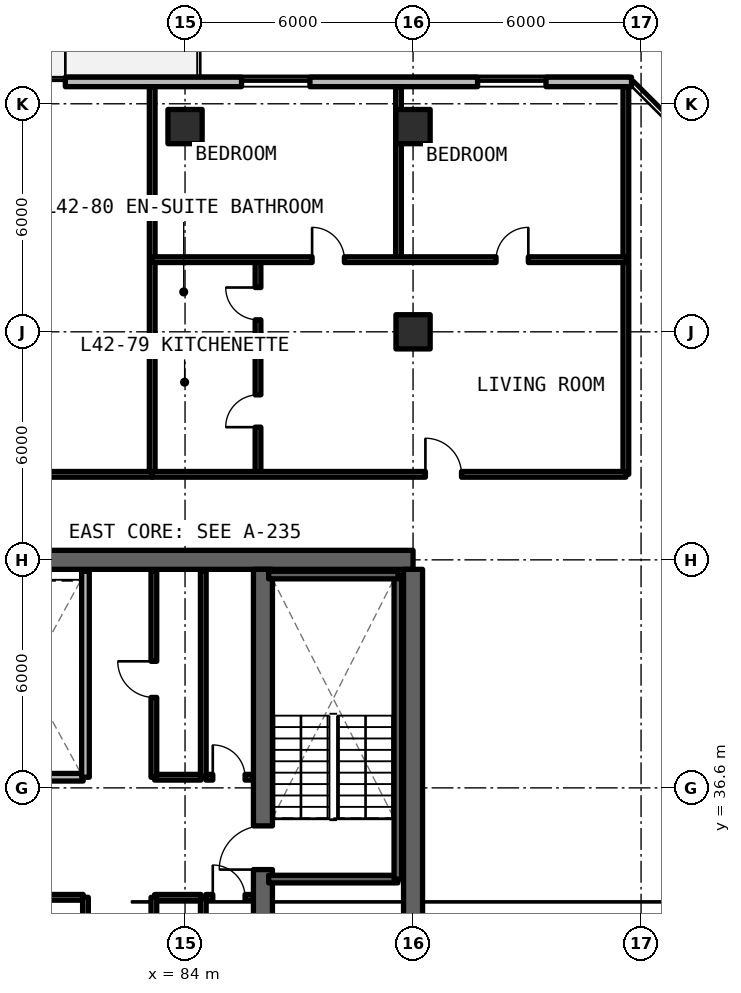
"""IFC4 building model, lengths in metres.
Left out: names, types, materials, properties, quantities, classifications, styles, units other than length and angle.
Written with IfcOpenShell. Run it as: python <this file> out.ifc"""

import sys

from ifc_helpers import new_model, si_unit, direction, frame, frame_2d, origin, origin_2d, place, context, subcontext, project, spatial, rectangle, extrude, element, fill, save


model = new_model("IFC4")
c1 = context("Model", 3, precision=1e-05, world=origin(), true_north=direction((0.0, 1.0)))
c2 = subcontext(c1, "Body", "Model", "MODEL_VIEW")
j1 = project(units=[si_unit("LENGTHUNIT", "METRE"), si_unit("PLANEANGLEUNIT", "RADIAN")], contexts=[c1])
p1 = place(None, origin())
s1 = spatial("IfcSite", under=j1, at=p1, CompositionType="ELEMENT")
p2 = place(p1, origin())
s2 = spatial("IfcBuilding", under=s1, at=p2, CompositionType="ELEMENT")
p3 = place(p2, frame((0.0, 0.0, 151.8)))
s3 = spatial("IfcBuildingStorey", under=s2, at=p3, CompositionType="ELEMENT", Elevation=151.8)
p4 = place(p3, frame((90.0, 42.6, 0.0), z_axis=(0.0, 0.0, 1.0), x_axis=(-1.0, 0.0, 0.0)))
e1 = element("IfcWall", 1, at=p4, inside=s3, PredefinedType="SHEAR", context=c2, shape_type="SweptSolid", body=[
    extrude(rectangle(XDim=12.0, YDim=0.5, at=frame_2d((6.0, 0.0))), origin(), (0.0, 0.0, 1.0), 3.3),
])
p5 = place(p3, frame((90.0, 24.85, 0.0), z_axis=(0.0, 0.0, 1.0), x_axis=(0.0, 1.0, 0.0)))
e2 = element("IfcWall", 2, at=p5, inside=s3, PredefinedType="SHEAR", context=c2, shape_type="SweptSolid", body=[
    extrude(rectangle(XDim=17.5, YDim=0.5, at=frame_2d((8.75, 0.0))), origin(), (0.0, 0.0, 1.0), 3.3),
])
p6 = place(p3, frame((86.05, 24.85, 0.0), z_axis=(0.0, 0.0, 1.0), x_axis=(0.0, 1.0, 0.0)))
e3 = element("IfcWall", 3, at=p6, inside=s3, PredefinedType="SHEAR", context=c2, shape_type="SweptSolid", body=[
    extrude(rectangle(XDim=17.5, YDim=0.5, at=frame_2d((8.75, 0.0))), origin(), (0.0, 0.0, 1.0), 3.3),
])
p7 = place(p6, frame((0.4, 0.0, 0.0)))
e4 = element("IfcOpeningElement", 4, at=p7, cuts=e3, PredefinedType="OPENING", context=c2, shape_type="SweptSolid", body=[
    extrude(rectangle(XDim=1.15, YDim=2.15, at=frame_2d((0.575, 1.075))), frame((0.0, 0.26, 0.0), z_axis=(0.0, -1.0, 0.0), x_axis=(1.0, 0.0, 0.0)), (0.0, 0.0, 1.0), 0.52),
])
p8 = place(p6, frame((9.6, 0.0, 0.0)))
e5 = element("IfcOpeningElement", 5, at=p8, cuts=e3, PredefinedType="OPENING", context=c2, shape_type="SweptSolid", body=[
    extrude(rectangle(XDim=1.15, YDim=2.15, at=frame_2d((0.575, 1.075))), frame((0.0, 0.26, 0.0), z_axis=(0.0, -1.0, 0.0), x_axis=(1.0, 0.0, 0.0)), (0.0, 0.0, 1.0), 0.52),
])
for number, where, z_axis, x_axis in (
    (6, (90.0, 48.6, 0.0), (0.0, 0.0, 1.0), (1.0, 0.0, 0.0)),
    (7, (84.0, 54.0, 0.0), (0.0, 0.0, 1.0), (1.0, 0.0, 0.0)),
    (8, (90.0, 54.0, 0.0), (0.0, 0.0, 1.0), (1.0, 0.0, 0.0)),
):
    element("IfcColumn", number, at=place(p3, frame(where, z_axis=z_axis, x_axis=x_axis)), inside=s3, PredefinedType="COLUMN", context=c2, shape_type="SweptSolid", body=[
        extrude(rectangle(XDim=0.9, YDim=0.9, at=origin_2d()), origin(), (0.0, 0.0, 1.0), 3.3),
    ])
p9 = place(p3, frame((95.748, 55.175, 0.0), z_axis=(0.0, 0.0, 1.0), x_axis=(-1.0, 0.0, 0.0)))
e9 = element("IfcWall", 9, at=p9, inside=s3, PredefinedType="SOLIDWALL", context=c2, shape_type="SweptSolid", body=[
    extrude(rectangle(XDim=43.623, YDim=0.25, at=frame_2d((21.812, 0.0))), origin(), (0.0, 0.0, 1.0), 3.08),
])
p10 = place(p9, frame((26.748, 0.0, 0.0)))
e10 = element("IfcOpeningElement", 10, at=p10, cuts=e9, PredefinedType="OPENING", context=c2, shape_type="SweptSolid", body=[
    extrude(rectangle(XDim=1.1, YDim=2.15, at=frame_2d((0.55, 1.075))), frame((0.0, 0.135, 0.0), z_axis=(0.0, -1.0, 0.0), x_axis=(1.0, 0.0, 0.0)), (0.0, 0.0, 1.0), 0.27),
])
p11 = place(p9, frame((14.898, 0.0, 0.0)))
e11 = element("IfcOpeningElement", 11, at=p11, cuts=e9, PredefinedType="OPENING", context=c2, shape_type="SweptSolid", body=[
    extrude(rectangle(XDim=1.1, YDim=2.15, at=frame_2d((0.55, 1.075))), frame((0.0, 0.135, 0.0), z_axis=(0.0, -1.0, 0.0), x_axis=(1.0, 0.0, 0.0)), (0.0, 0.0, 1.0), 0.27),
])
p12 = place(p9, frame((39.082, 0.0, 0.78)))
e12 = element("IfcOpeningElement", 12, at=p12, cuts=e9, PredefinedType="OPENING", context=c2, shape_type="SweptSolid", body=[
    extrude(rectangle(XDim=1.8, YDim=1.66, at=frame_2d((0.9, 0.83))), frame((0.0, 0.135, 0.0), z_axis=(0.0, -1.0, 0.0), x_axis=(1.0, 0.0, 0.0)), (0.0, 0.0, 1.0), 0.27),
])
p13 = place(p9, frame((33.045, 0.0, 0.78)))
e13 = element("IfcOpeningElement", 13, at=p13, cuts=e9, PredefinedType="OPENING", context=c2, shape_type="SweptSolid", body=[
    extrude(rectangle(XDim=1.8, YDim=1.66, at=frame_2d((0.9, 0.83))), frame((0.0, 0.135, 0.0), z_axis=(0.0, -1.0, 0.0), x_axis=(1.0, 0.0, 0.0)), (0.0, 0.0, 1.0), 0.27),
])
p14 = place(p9, frame((8.462, 0.0, 0.78)))
e14 = element("IfcOpeningElement", 14, at=p14, cuts=e9, PredefinedType="OPENING", context=c2, shape_type="SweptSolid", body=[
    extrude(rectangle(XDim=1.8, YDim=1.66, at=frame_2d((0.9, 0.83))), frame((0.0, 0.135, 0.0), z_axis=(0.0, -1.0, 0.0), x_axis=(1.0, 0.0, 0.0)), (0.0, 0.0, 1.0), 0.27),
])
p15 = place(p9, frame((2.25, 0.0, 0.78)))
e15 = element("IfcOpeningElement", 15, at=p15, cuts=e9, PredefinedType="OPENING", context=c2, shape_type="SweptSolid", body=[
    extrude(rectangle(XDim=1.8, YDim=1.66, at=frame_2d((0.9, 0.83))), frame((0.0, 0.135, 0.0), z_axis=(0.0, -1.0, 0.0), x_axis=(1.0, 0.0, 0.0)), (0.0, 0.0, 1.0), 0.27),
])
p16 = place(p3, frame((84.48, 28.5, 0.0), z_axis=(0.0, 0.0, 1.0), x_axis=(0.0, 1.0, 0.0)))
e16 = element("IfcWall", 16, at=p16, inside=s3, PredefinedType="SOLIDWALL", context=c2, shape_type="SweptSolid", body=[
    extrude(rectangle(XDim=5.22, YDim=0.15, at=frame_2d((2.61, 0.0))), origin(), (0.0, 0.0, 1.0), 2.35),
])
p17 = place(p3, frame((84.55, 33.72, 0.0), z_axis=(0.0, 0.0, 1.0), x_axis=(1.0, 0.0, 0.0)))
e17 = element("IfcWall", 17, at=p17, inside=s3, PredefinedType="SOLIDWALL", context=c2, shape_type="SweptSolid", body=[
    extrude(rectangle(XDim=1.23, YDim=0.15, at=frame_2d((0.615, 0.0))), origin(), (0.0, 0.0, 1.0), 2.35),
])
p18 = place(p17, frame((0.18, 0.0, 0.0)))
e18 = element("IfcOpeningElement", 18, at=p18, cuts=e17, PredefinedType="OPENING", context=c2, shape_type="SweptSolid", body=[
    extrude(rectangle(XDim=0.85, YDim=2.1, at=frame_2d((0.425, 1.05))), frame((0.0, 0.085, 0.0), z_axis=(0.0, -1.0, 0.0), x_axis=(1.0, 0.0, 0.0)), (0.0, 0.0, 1.0), 0.17),
])
p19 = place(p3, frame((83.2, 33.72, 0.0), z_axis=(0.0, 0.0, 1.0), x_axis=(1.0, 0.0, 0.0)))
e19 = element("IfcWall", 19, at=p19, inside=s3, PredefinedType="SOLIDWALL", context=c2, shape_type="SweptSolid", body=[
    extrude(rectangle(XDim=1.22, YDim=0.15, at=frame_2d((0.61, 0.0))), origin(), (0.0, 0.0, 1.0), 2.35),
])
p20 = place(p3, frame((83.18, 28.5, 0.0), z_axis=(0.0, 0.0, 1.0), x_axis=(0.0, 1.0, 0.0)))
e20 = element("IfcWall", 20, at=p20, inside=s3, PredefinedType="SOLIDWALL", context=c2, shape_type="SweptSolid", body=[
    extrude(rectangle(XDim=5.22, YDim=0.15, at=frame_2d((2.61, 0.0))), origin(), (0.0, 0.0, 1.0), 2.35),
])
p21 = place(p20, frame((2.0, 0.0, 0.0)))
e21 = element("IfcOpeningElement", 21, at=p21, cuts=e20, PredefinedType="OPENING", context=c2, shape_type="SweptSolid", body=[
    extrude(rectangle(XDim=0.95, YDim=2.15, at=frame_2d((0.475, 1.075))), frame((0.0, 0.085, 0.0), z_axis=(0.0, -1.0, 0.0), x_axis=(1.0, 0.0, 0.0)), (0.0, 0.0, 1.0), 0.17),
])
p22 = place(p3, frame((79.76, 33.72, 0.0), z_axis=(0.0, 0.0, 1.0), x_axis=(1.0, 0.0, 0.0)))
e22 = element("IfcWall", 22, at=p22, inside=s3, PredefinedType="SOLIDWALL", context=c2, shape_type="SweptSolid", body=[
    extrude(rectangle(XDim=1.56, YDim=0.15, at=frame_2d((0.78, 0.0))), origin(), (0.0, 0.0, 1.0), 2.35),
])
p23 = place(p3, frame((81.38, 28.5, 0.0), z_axis=(0.0, 0.0, 1.0), x_axis=(0.0, 1.0, 0.0)))
e23 = element("IfcWall", 23, at=p23, inside=s3, PredefinedType="SOLIDWALL", context=c2, shape_type="SweptSolid", body=[
    extrude(rectangle(XDim=5.22, YDim=0.15, at=frame_2d((2.61, 0.0))), origin(), (0.0, 0.0, 1.0), 2.35),
])
p24 = place(p23, frame((2.0, 0.0, 0.0)))
e24 = element("IfcOpeningElement", 24, at=p24, cuts=e23, PredefinedType="OPENING", context=c2, shape_type="SweptSolid", body=[
    extrude(rectangle(XDim=0.95, YDim=2.15, at=frame_2d((0.475, 1.075))), frame((0.0, 0.085, 0.0), z_axis=(0.0, -1.0, 0.0), x_axis=(1.0, 0.0, 0.0)), (0.0, 0.0, 1.0), 0.17),
])
p25 = place(p3, frame((84.48, 36.88, 0.0), z_axis=(0.0, 0.0, 1.0), x_axis=(0.0, 1.0, 0.0)))
e25 = element("IfcWall", 25, at=p25, inside=s3, PredefinedType="SOLIDWALL", context=c2, shape_type="SweptSolid", body=[
    extrude(rectangle(XDim=5.42, YDim=0.15, at=frame_2d((2.71, 0.0))), origin(), (0.0, 0.0, 1.0), 2.35),
])
p26 = place(p3, frame((84.55, 36.88, 0.0), z_axis=(0.0, 0.0, 1.0), x_axis=(1.0, 0.0, 0.0)))
e26 = element("IfcWall", 26, at=p26, inside=s3, PredefinedType="SOLIDWALL", context=c2, shape_type="SweptSolid", body=[
    extrude(rectangle(XDim=1.23, YDim=0.15, at=frame_2d((0.615, 0.0))), origin(), (0.0, 0.0, 1.0), 2.35),
])
p27 = place(p26, frame((0.18, 0.0, 0.0)))
e27 = element("IfcOpeningElement", 27, at=p27, cuts=e26, PredefinedType="OPENING", context=c2, shape_type="SweptSolid", body=[
    extrude(rectangle(XDim=0.85, YDim=2.1, at=frame_2d((0.425, 1.05))), frame((0.0, 0.085, 0.0), z_axis=(0.0, -1.0, 0.0), x_axis=(1.0, 0.0, 0.0)), (0.0, 0.0, 1.0), 0.17),
])
p28 = place(p3, frame((83.2, 36.88, 0.0), z_axis=(0.0, 0.0, 1.0), x_axis=(1.0, 0.0, 0.0)))
e28 = element("IfcWall", 28, at=p28, inside=s3, PredefinedType="SOLIDWALL", context=c2, shape_type="SweptSolid", body=[
    extrude(rectangle(XDim=1.22, YDim=0.15, at=frame_2d((0.61, 0.0))), origin(), (0.0, 0.0, 1.0), 2.35),
])
p29 = place(p3, frame((83.18, 36.88, 0.0), z_axis=(0.0, 0.0, 1.0), x_axis=(0.0, 1.0, 0.0)))
e29 = element("IfcWall", 29, at=p29, inside=s3, PredefinedType="SOLIDWALL", context=c2, shape_type="SweptSolid", body=[
    extrude(rectangle(XDim=5.42, YDim=0.15, at=frame_2d((2.71, 0.0))), origin(), (0.0, 0.0, 1.0), 2.35),
])
p30 = place(p29, frame((2.1, 0.0, 0.0)))
e30 = element("IfcOpeningElement", 30, at=p30, cuts=e29, PredefinedType="OPENING", context=c2, shape_type="SweptSolid", body=[
    extrude(rectangle(XDim=0.95, YDim=2.15, at=frame_2d((0.475, 1.075))), frame((0.0, 0.085, 0.0), z_axis=(0.0, -1.0, 0.0), x_axis=(1.0, 0.0, 0.0)), (0.0, 0.0, 1.0), 0.17),
])
p31 = place(p3, frame((78.27, 36.88, 0.0), z_axis=(0.0, 0.0, 1.0), x_axis=(1.0, 0.0, 0.0)))
e31 = element("IfcWall", 31, at=p31, inside=s3, PredefinedType="SOLIDWALL", context=c2, shape_type="SweptSolid", body=[
    extrude(rectangle(XDim=3.05, YDim=0.2, at=frame_2d((1.525, 0.0))), origin(), (0.0, 0.0, 1.0), 2.35),
])
p32 = place(p3, frame((81.38, 36.88, 0.0), z_axis=(0.0, 0.0, 1.0), x_axis=(0.0, 1.0, 0.0)))
e32 = element("IfcWall", 32, at=p32, inside=s3, PredefinedType="SOLIDWALL", context=c2, shape_type="SweptSolid", body=[
    extrude(rectangle(XDim=5.42, YDim=0.2, at=frame_2d((2.71, 0.0))), origin(), (0.0, 0.0, 1.0), 2.35),
])
for number, where, z_axis, x_axis in (
    (33, (95.6, 44.85, 0.0), (0.0, 0.0, 1.0), (0.0, 1.0, 0.0)),
    (34, (83.136, 44.85, 0.0), (0.0, 0.0, 1.0), (0.0, 1.0, 0.0)),
):
    element("IfcWall", number, at=place(p3, frame(where, z_axis=z_axis, x_axis=x_axis)), inside=s3, PredefinedType="SOLIDWALL", context=c2, shape_type="SweptSolid", body=[
        extrude(rectangle(XDim=10.2, YDim=0.15, at=frame_2d((5.1, 0.0))), origin(), (0.0, 0.0, 1.0), 2.35),
    ])
p33 = place(p3, frame((73.28, 44.85, 0.0), z_axis=(0.0, 0.0, 1.0), x_axis=(1.0, 0.0, 0.0)))
e35 = element("IfcWall", 35, at=p33, inside=s3, PredefinedType="SOLIDWALL", context=c2, shape_type="SweptSolid", body=[
    extrude(rectangle(XDim=9.855, YDim=0.15, at=frame_2d((4.928, 0.0))), origin(), (0.0, 0.0, 1.0), 2.35),
])
p34 = place(p33, frame((4.378, 0.0, 0.0)))
e36 = element("IfcOpeningElement", 36, at=p34, cuts=e35, PredefinedType="OPENING", context=c2, shape_type="SweptSolid", body=[
    extrude(rectangle(XDim=1.1, YDim=2.15, at=frame_2d((0.55, 1.075))), frame((0.0, 0.085, 0.0), z_axis=(0.0, -1.0, 0.0), x_axis=(1.0, 0.0, 0.0)), (0.0, 0.0, 1.0), 0.17),
])
p35 = place(p3, frame((83.136, 48.183, 0.0), z_axis=(0.0, 0.0, 1.0), x_axis=(1.0, 0.0, 0.0)))
e37 = element("IfcWall", 37, at=p35, inside=s3, PredefinedType="PARTITIONING", context=c2, shape_type="SweptSolid", body=[
    extrude(rectangle(XDim=2.784, YDim=0.15, at=frame_2d((1.392, 0.0))), origin(), (0.0, 0.0, 1.0), 2.35),
])
p36 = place(p3, frame((85.92, 44.85, 0.0), z_axis=(0.0, 0.0, 1.0), x_axis=(0.0, 1.0, 0.0)))
e38 = element("IfcWall", 38, at=p36, inside=s3, PredefinedType="PARTITIONING", context=c2, shape_type="SweptSolid", body=[
    extrude(rectangle(XDim=5.648, YDim=0.15, at=frame_2d((2.824, 0.0))), origin(), (0.0, 0.0, 1.0), 2.35),
])
p37 = place(p36, frame((1.241, 0.0, 0.0)))
e39 = element("IfcOpeningElement", 39, at=p37, cuts=e38, PredefinedType="OPENING", context=c2, shape_type="SweptSolid", body=[
    extrude(rectangle(XDim=0.85, YDim=2.1, at=frame_2d((0.425, 1.05))), frame((0.0, 0.085, 0.0), z_axis=(0.0, -1.0, 0.0), x_axis=(1.0, 0.0, 0.0)), (0.0, 0.0, 1.0), 0.17),
])
p38 = place(p36, frame((4.065, 0.0, 0.0)))
e40 = element("IfcOpeningElement", 40, at=p38, cuts=e38, PredefinedType="OPENING", context=c2, shape_type="SweptSolid", body=[
    extrude(rectangle(XDim=0.85, YDim=2.1, at=frame_2d((0.425, 1.05))), frame((0.0, 0.085, 0.0), z_axis=(0.0, -1.0, 0.0), x_axis=(1.0, 0.0, 0.0)), (0.0, 0.0, 1.0), 0.17),
])
p39 = place(p3, frame((89.617, 50.499, 0.0), z_axis=(0.0, 0.0, 1.0), x_axis=(0.0, 1.0, 0.0)))
e41 = element("IfcWall", 41, at=p39, inside=s3, PredefinedType="PARTITIONING", context=c2, shape_type="SweptSolid", body=[
    extrude(rectangle(XDim=4.552, YDim=0.15, at=frame_2d((2.276, 0.0))), origin(), (0.0, 0.0, 1.0), 2.35),
])
p40 = place(p3, frame((83.136, 50.499, 0.0), z_axis=(0.0, 0.0, 1.0), x_axis=(1.0, 0.0, 0.0)))
e42 = element("IfcWall", 42, at=p40, inside=s3, PredefinedType="PARTITIONING", context=c2, shape_type="SweptSolid", body=[
    extrude(rectangle(XDim=12.464, YDim=0.15, at=frame_2d((6.232, 0.0))), origin(), (0.0, 0.0, 1.0), 2.35),
])
p41 = place(p40, frame((4.208, 0.0, 0.0)))
e43 = element("IfcOpeningElement", 43, at=p41, cuts=e42, PredefinedType="OPENING", context=c2, shape_type="SweptSolid", body=[
    extrude(rectangle(XDim=0.85, YDim=2.1, at=frame_2d((0.425, 1.05))), frame((0.0, 0.085, 0.0), z_axis=(0.0, -1.0, 0.0), x_axis=(1.0, 0.0, 0.0)), (0.0, 0.0, 1.0), 0.17),
])
p42 = place(p40, frame((9.048, 0.0, 0.0)))
e44 = element("IfcOpeningElement", 44, at=p42, cuts=e42, PredefinedType="OPENING", context=c2, shape_type="SweptSolid", body=[
    extrude(rectangle(XDim=0.85, YDim=2.1, at=frame_2d((0.425, 1.05))), frame((0.0, 0.085, 0.0), z_axis=(0.0, -1.0, 0.0), x_axis=(1.0, 0.0, 0.0)), (0.0, 0.0, 1.0), 0.17),
])
p43 = place(p3, frame((83.136, 44.85, 0.0), z_axis=(0.0, 0.0, 1.0), x_axis=(1.0, 0.0, 0.0)))
e45 = element("IfcWall", 45, at=p43, inside=s3, PredefinedType="SOLIDWALL", context=c2, shape_type="SweptSolid", body=[
    extrude(rectangle(XDim=12.464, YDim=0.15, at=frame_2d((6.232, 0.0))), origin(), (0.0, 0.0, 1.0), 2.35),
])
p44 = place(p43, frame((7.189, 0.0, 0.0)))
e46 = element("IfcOpeningElement", 46, at=p44, cuts=e45, PredefinedType="OPENING", context=c2, shape_type="SweptSolid", body=[
    extrude(rectangle(XDim=0.95, YDim=2.15, at=frame_2d((0.475, 1.075))), frame((0.0, 0.085, 0.0), z_axis=(0.0, -1.0, 0.0), x_axis=(1.0, 0.0, 0.0)), (0.0, 0.0, 1.0), 0.17),
])
p45 = place(p3, frame((86.2, 34.2, 0.0), z_axis=(0.0, 0.0, 1.0), x_axis=(1.0, 0.0, 0.0)))
e47 = element("IfcWall", 47, at=p45, inside=s3, PredefinedType="SOLIDWALL", context=c2, shape_type="SweptSolid", body=[
    extrude(rectangle(XDim=3.4, YDim=0.2, at=frame_2d((1.7, 0.0))), origin(), (0.0, 0.0, 1.0), 3.3),
])
p46 = place(p3, frame((89.6, 34.2, 0.0), z_axis=(0.0, 0.0, 1.0), x_axis=(0.0, 1.0, 0.0)))
e48 = element("IfcWall", 48, at=p46, inside=s3, PredefinedType="SOLIDWALL", context=c2, shape_type="SweptSolid", body=[
    extrude(rectangle(XDim=8.0, YDim=0.2, at=frame_2d((4.0, 0.0))), origin(), (0.0, 0.0, 1.0), 3.3),
])
p47 = place(p3, frame((89.6, 42.2, 0.0), z_axis=(0.0, 0.0, 1.0), x_axis=(-1.0, 0.0, 0.0)))
e49 = element("IfcWall", 49, at=p47, inside=s3, PredefinedType="SOLIDWALL", context=c2, shape_type="SweptSolid", body=[
    extrude(rectangle(XDim=3.4, YDim=0.2, at=frame_2d((1.7, 0.0))), origin(), (0.0, 0.0, 1.0), 3.3),
])
p48 = place(p11, frame((1.1, 0.0, 0.0), z_axis=(0.0, 0.0, 1.0), x_axis=(-1.0, 0.0, 0.0)))
e50 = element("IfcDoor", 50, at=p48, inside=s3, OperationType="SINGLE_SWING_LEFT", PredefinedType="DOOR", context=c2, shape_type="SweptSolid", body=[
    extrude(rectangle(XDim=1.1, YDim=2.15, at=frame_2d((0.55, 1.075))), frame((0.0, 0.025, 0.0), z_axis=(0.0, -1.0, 0.0), x_axis=(1.0, 0.0, 0.0)), (0.0, 0.0, 1.0), 0.05),
])
fill(e11, e50)
p49 = place(p14, origin())
e51 = element("IfcWindow", 51, at=p49, inside=s3, PartitioningType="SINGLE_PANEL", PredefinedType="WINDOW", context=c2, shape_type="SweptSolid", body=[
    extrude(rectangle(XDim=1.8, YDim=1.66, at=frame_2d((0.9, 0.83))), frame((0.0, 0.03, 0.0), z_axis=(0.0, -1.0, 0.0), x_axis=(1.0, 0.0, 0.0)), (0.0, 0.0, 1.0), 0.06),
])
fill(e14, e51)
p50 = place(p15, origin())
e52 = element("IfcWindow", 52, at=p50, inside=s3, PartitioningType="SINGLE_PANEL", PredefinedType="WINDOW", context=c2, shape_type="SweptSolid", body=[
    extrude(rectangle(XDim=1.8, YDim=1.66, at=frame_2d((0.9, 0.83))), frame((0.0, 0.03, 0.0), z_axis=(0.0, -1.0, 0.0), x_axis=(1.0, 0.0, 0.0)), (0.0, 0.0, 1.0), 0.06),
])
fill(e15, e52)
p51 = place(p18, origin())
e53 = element("IfcDoor", 53, at=p51, inside=s3, OperationType="SINGLE_SWING_LEFT", PredefinedType="DOOR", context=c2, shape_type="SweptSolid", body=[
    extrude(rectangle(XDim=0.85, YDim=2.1, at=frame_2d((0.425, 1.05))), frame((0.0, 0.025, 0.0), z_axis=(0.0, -1.0, 0.0), x_axis=(1.0, 0.0, 0.0)), (0.0, 0.0, 1.0), 0.05),
])
fill(e18, e53)
p52 = place(p27, origin())
e54 = element("IfcDoor", 54, at=p52, inside=s3, OperationType="SINGLE_SWING_LEFT", PredefinedType="DOOR", context=c2, shape_type="SweptSolid", body=[
    extrude(rectangle(XDim=0.85, YDim=2.1, at=frame_2d((0.425, 1.05))), frame((0.0, 0.025, 0.0), z_axis=(0.0, -1.0, 0.0), x_axis=(1.0, 0.0, 0.0)), (0.0, 0.0, 1.0), 0.05),
])
fill(e27, e54)
p53 = place(p30, origin())
e55 = element("IfcDoor", 55, at=p53, inside=s3, OperationType="SINGLE_SWING_RIGHT", PredefinedType="DOOR", context=c2, shape_type="SweptSolid", body=[
    extrude(rectangle(XDim=0.95, YDim=2.15, at=frame_2d((0.475, 1.075))), frame((0.0, 0.025, 0.0), z_axis=(0.0, -1.0, 0.0), x_axis=(1.0, 0.0, 0.0)), (0.0, 0.0, 1.0), 0.05),
])
fill(e30, e55)
p54 = place(p37, origin())
e56 = element("IfcDoor", 56, at=p54, inside=s3, OperationType="SINGLE_SWING_LEFT", PredefinedType="DOOR", context=c2, shape_type="SweptSolid", body=[
    extrude(rectangle(XDim=0.85, YDim=2.1, at=frame_2d((0.425, 1.05))), frame((0.0, 0.025, 0.0), z_axis=(0.0, -1.0, 0.0), x_axis=(1.0, 0.0, 0.0)), (0.0, 0.0, 1.0), 0.05),
])
fill(e39, e56)
p55 = place(p38, origin())
e57 = element("IfcDoor", 57, at=p55, inside=s3, OperationType="SINGLE_SWING_RIGHT", PredefinedType="DOOR", context=c2, shape_type="SweptSolid", body=[
    extrude(rectangle(XDim=0.85, YDim=2.1, at=frame_2d((0.425, 1.05))), frame((0.0, 0.025, 0.0), z_axis=(0.0, -1.0, 0.0), x_axis=(1.0, 0.0, 0.0)), (0.0, 0.0, 1.0), 0.05),
])
fill(e40, e57)
p56 = place(p41, origin())
e58 = element("IfcDoor", 58, at=p56, inside=s3, OperationType="SINGLE_SWING_LEFT", PredefinedType="DOOR", context=c2, shape_type="SweptSolid", body=[
    extrude(rectangle(XDim=0.85, YDim=2.1, at=frame_2d((0.425, 1.05))), frame((0.0, 0.025, 0.0), z_axis=(0.0, -1.0, 0.0), x_axis=(1.0, 0.0, 0.0)), (0.0, 0.0, 1.0), 0.05),
])
fill(e43, e58)
p57 = place(p42, origin())
e59 = element("IfcDoor", 59, at=p57, inside=s3, OperationType="SINGLE_SWING_RIGHT", PredefinedType="DOOR", context=c2, shape_type="SweptSolid", body=[
    extrude(rectangle(XDim=0.85, YDim=2.1, at=frame_2d((0.425, 1.05))), frame((0.0, 0.025, 0.0), z_axis=(0.0, -1.0, 0.0), x_axis=(1.0, 0.0, 0.0)), (0.0, 0.0, 1.0), 0.05),
])
fill(e44, e59)
p58 = place(p44, origin())
e60 = element("IfcDoor", 60, at=p58, inside=s3, OperationType="SINGLE_SWING_LEFT", PredefinedType="DOOR", context=c2, shape_type="SweptSolid", body=[
    extrude(rectangle(XDim=0.95, YDim=2.15, at=frame_2d((0.475, 1.075))), frame((0.0, 0.025, 0.0), z_axis=(0.0, -1.0, 0.0), x_axis=(1.0, 0.0, 0.0)), (0.0, 0.0, 1.0), 0.05),
])
fill(e46, e60)
p59 = place(p8, origin())
e61 = element("IfcDoor", 61, at=p59, inside=s3, OperationType="SINGLE_SWING_LEFT", PredefinedType="DOOR", context=c2, shape_type="SweptSolid", body=[
    extrude(rectangle(XDim=1.15, YDim=2.15, at=frame_2d((0.575, 1.075))), frame((0.0, 0.025, 0.0), z_axis=(0.0, -1.0, 0.0), x_axis=(1.0, 0.0, 0.0)), (0.0, 0.0, 1.0), 0.05),
])
fill(e5, e61)
save(model, sys.argv[1])
